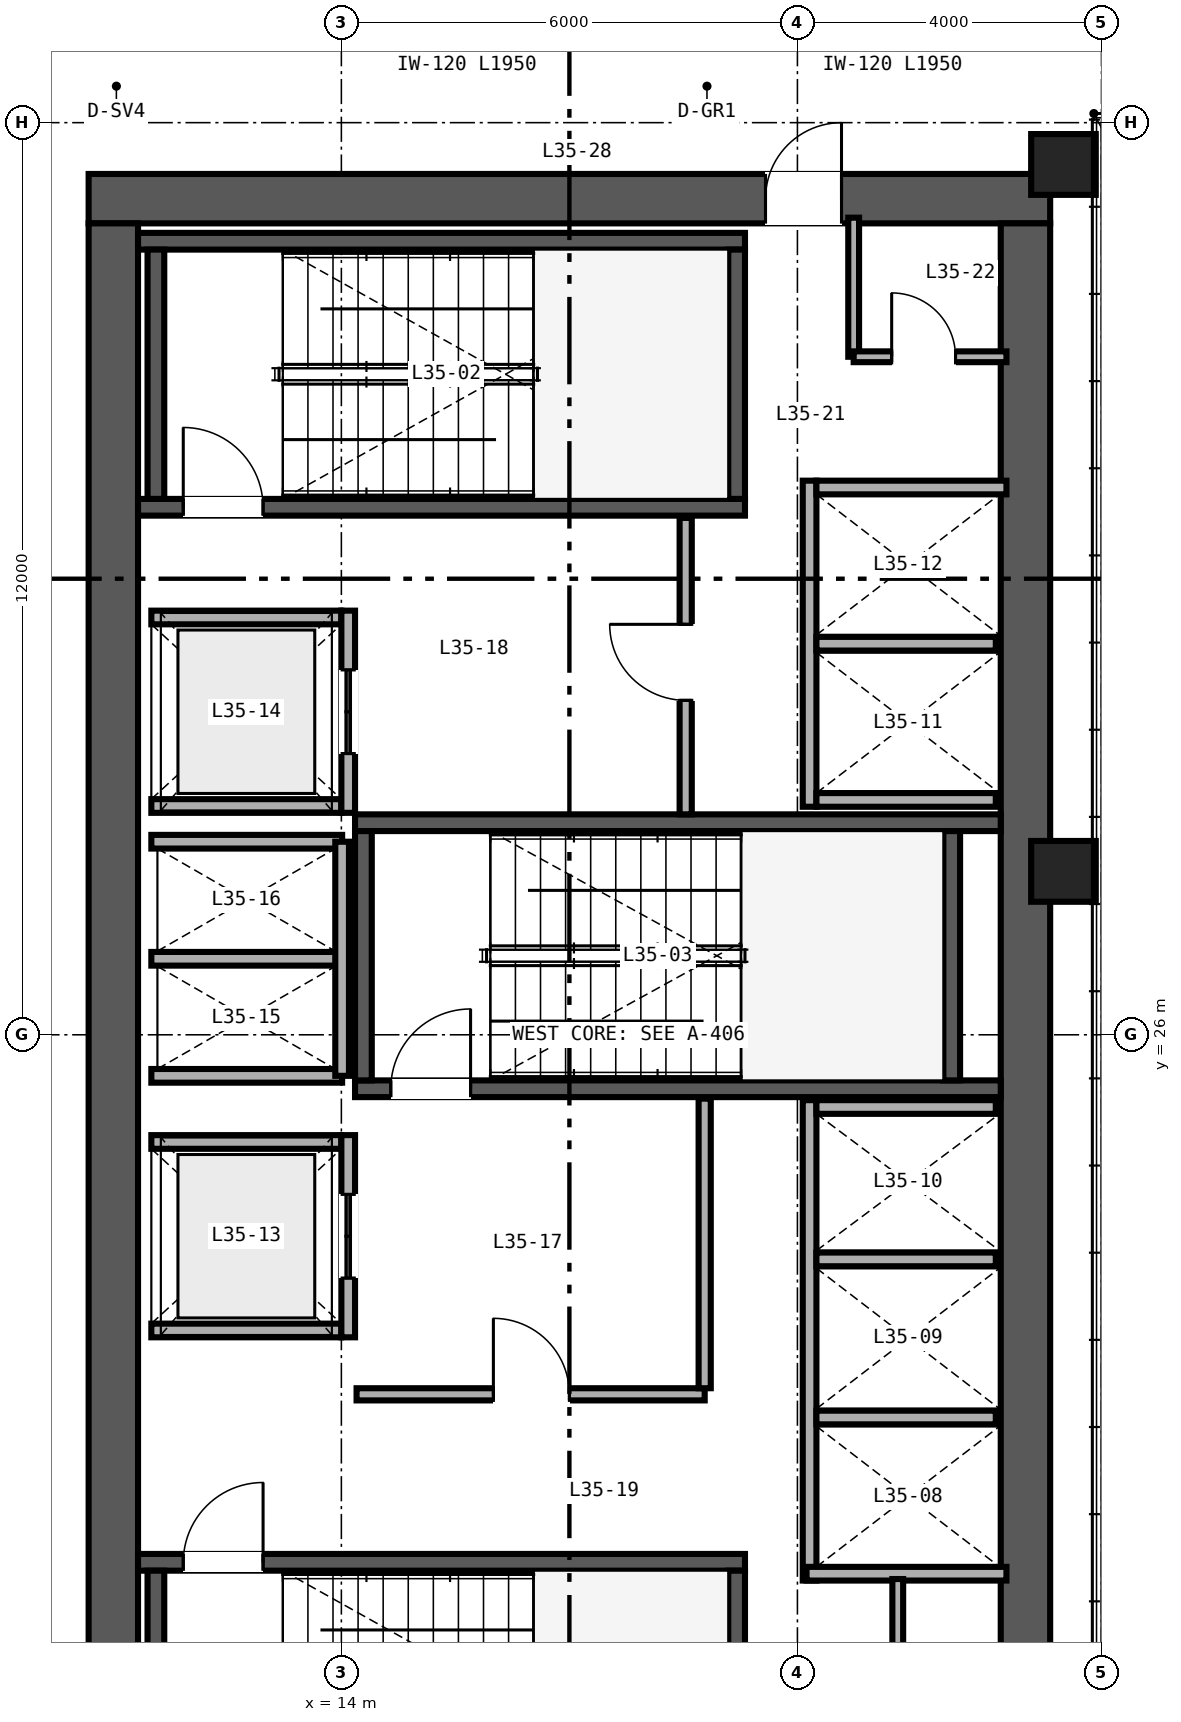
"""IFC4 building model, lengths in metres.
Left out: names, types, materials, properties, quantities, classifications, styles, units other than length and angle.
Written with IfcOpenShell. Run it as: python <this file> out.ifc"""

import sys

from ifc_helpers import new_model, si_unit, direction, frame, frame_2d, origin, origin_2d, place, context, subcontext, project, spatial, rectangle, hollow_rectangle, extrude, source, transform, mapped, element, fill, save


model = new_model("IFC4")
c1 = context("Model", 3, precision=1e-05, world=origin(), true_north=direction((0.0, 1.0)))
c2 = subcontext(c1, "Body", "Model", "MODEL_VIEW")
j1 = project(units=[si_unit("LENGTHUNIT", "METRE"), si_unit("PLANEANGLEUNIT", "RADIAN")], contexts=[c1])
p1 = place(None, origin())
s1 = spatial("IfcSite", under=j1, at=p1, CompositionType="ELEMENT")
p2 = place(p1, origin())
s2 = spatial("IfcBuilding", under=s1, at=p2, CompositionType="ELEMENT")
p3 = place(p2, frame((0.0, 0.0, 140.4)))
s3 = spatial("IfcBuildingStorey", under=s2, at=p3, CompositionType="ELEMENT", Elevation=140.4)
p4 = place(p3, frame((10.675, 37.0, 0.0), z_axis=(0.0, 0.0, 1.0), x_axis=(1.0, 0.0, 0.0)))
e1 = element("IfcWall", 1, at=p4, inside=s3, PredefinedType="SHEAR", context=c2, shape_type="SweptSolid", body=[
    extrude(rectangle(XDim=12.65, YDim=0.65, at=frame_2d((6.325, 0.0))), origin(), (0.0, 0.0, 1.0), 3.36),
])
p5 = place(p4, frame((8.905, 0.0, 0.0)))
e2 = element("IfcOpeningElement", 2, at=p5, cuts=e1, PredefinedType="OPENING", context=c2, shape_type="SweptSolid", body=[
    extrude(rectangle(XDim=1.0, YDim=2.15, at=frame_2d((0.5, 1.075))), frame((0.0, 0.335, 0.0), z_axis=(0.0, -1.0, 0.0), x_axis=(1.0, 0.0, 0.0)), (0.0, 0.0, 1.0), 0.67),
])
for number, where, z_axis, x_axis in (
    (3, (11.0, 15.325, 0.0), (0.0, 0.0, 1.0), (0.0, 1.0, 0.0)),
    (4, (23.0, 15.325, 0.0), (0.0, 0.0, 1.0), (0.0, 1.0, 0.0)),
):
    element("IfcWall", number, at=place(p3, frame(where, z_axis=z_axis, x_axis=x_axis)), inside=s3, PredefinedType="SHEAR", context=c2, shape_type="SweptSolid", body=[
        extrude(rectangle(XDim=21.35, YDim=0.65, at=frame_2d((10.675, 0.0))), origin(), (0.0, 0.0, 1.0), 3.36),
    ])
p6 = place(p3, frame((11.325, 19.06, 0.0), z_axis=(0.0, 0.0, 1.0), x_axis=(1.0, 0.0, 0.0)))
e5 = element("IfcWall", 5, at=p6, inside=s3, PredefinedType="SHEAR", context=c2, shape_type="SweptSolid", body=[
    extrude(rectangle(XDim=7.985, YDim=0.22, at=frame_2d((3.993, 0.0))), origin(), (0.0, 0.0, 1.0), 3.4),
])
p7 = place(p6, frame((0.595, 0.0, 0.0)))
e6 = element("IfcOpeningElement", 6, at=p7, cuts=e5, PredefinedType="OPENING", context=c2, shape_type="SweptSolid", body=[
    extrude(rectangle(XDim=1.05, YDim=2.15, at=frame_2d((0.525, 1.075))), frame((0.0, 0.12, 0.0), z_axis=(0.0, -1.0, 0.0), x_axis=(1.0, 0.0, 0.0)), (0.0, 0.0, 1.0), 0.24),
])
for number, where, z_axis, x_axis in (
    (7, (11.56, 15.67, 0.0), (0.0, 0.0, 1.0), (0.0, 1.0, 0.0)),
    (8, (19.2, 15.67, 0.0), (0.0, 0.0, 1.0), (0.0, 1.0, 0.0)),
):
    element("IfcWall", number, at=place(p3, frame(where, z_axis=z_axis, x_axis=x_axis)), inside=s3, PredefinedType="SHEAR", context=c2, shape_type="SweptSolid", body=[
        extrude(rectangle(XDim=3.28, YDim=0.22, at=frame_2d((1.64, 0.0))), origin(), (0.0, 0.0, 1.0), 3.4),
    ])
p8 = place(p3, frame((11.325, 32.94, 0.0), z_axis=(0.0, 0.0, 1.0), x_axis=(1.0, 0.0, 0.0)))
e9 = element("IfcWall", 9, at=p8, inside=s3, PredefinedType="SHEAR", context=c2, shape_type="SweptSolid", body=[
    extrude(rectangle(XDim=7.985, YDim=0.22, at=frame_2d((3.993, 0.0))), origin(), (0.0, 0.0, 1.0), 3.4),
])
p9 = place(p8, frame((0.595, 0.0, 0.0)))
e10 = element("IfcOpeningElement", 10, at=p9, cuts=e9, PredefinedType="OPENING", context=c2, shape_type="SweptSolid", body=[
    extrude(rectangle(XDim=1.05, YDim=2.15, at=frame_2d((0.525, 1.075))), frame((0.0, 0.12, 0.0), z_axis=(0.0, -1.0, 0.0), x_axis=(1.0, 0.0, 0.0)), (0.0, 0.0, 1.0), 0.24),
])
p10 = place(p3, frame((11.325, 36.44, 0.0), z_axis=(0.0, 0.0, 1.0), x_axis=(1.0, 0.0, 0.0)))
e11 = element("IfcWall", 11, at=p10, inside=s3, PredefinedType="SHEAR", context=c2, shape_type="SweptSolid", body=[
    extrude(rectangle(XDim=7.985, YDim=0.22, at=frame_2d((3.993, 0.0))), origin(), (0.0, 0.0, 1.0), 3.4),
])
for number, where, z_axis, x_axis in (
    (12, (11.56, 33.05, 0.0), (0.0, 0.0, 1.0), (0.0, 1.0, 0.0)),
    (13, (19.2, 33.05, 0.0), (0.0, 0.0, 1.0), (0.0, 1.0, 0.0)),
):
    element("IfcWall", number, at=place(p3, frame(where, z_axis=z_axis, x_axis=x_axis)), inside=s3, PredefinedType="SHEAR", context=c2, shape_type="SweptSolid", body=[
        extrude(rectangle(XDim=3.28, YDim=0.22, at=frame_2d((1.64, 0.0))), origin(), (0.0, 0.0, 1.0), 3.4),
    ])
p11 = place(p3, frame((14.18, 25.29, 0.0), z_axis=(0.0, 0.0, 1.0), x_axis=(1.0, 0.0, 0.0)))
e14 = element("IfcWall", 14, at=p11, inside=s3, PredefinedType="SHEAR", context=c2, shape_type="SweptSolid", body=[
    extrude(rectangle(XDim=8.495, YDim=0.22, at=frame_2d((4.248, 0.0))), origin(), (0.0, 0.0, 1.0), 3.4),
])
p12 = place(p11, frame((0.47, 0.0, 0.0)))
e15 = element("IfcOpeningElement", 15, at=p12, cuts=e14, PredefinedType="OPENING", context=c2, shape_type="SweptSolid", body=[
    extrude(rectangle(XDim=1.05, YDim=2.15, at=frame_2d((0.525, 1.075))), frame((0.0, 0.12, 0.0), z_axis=(0.0, -1.0, 0.0), x_axis=(1.0, 0.0, 0.0)), (0.0, 0.0, 1.0), 0.24),
])
p13 = place(p3, frame((14.18, 28.79, 0.0), z_axis=(0.0, 0.0, 1.0), x_axis=(1.0, 0.0, 0.0)))
e16 = element("IfcWall", 16, at=p13, inside=s3, PredefinedType="SHEAR", context=c2, shape_type="SweptSolid", body=[
    extrude(rectangle(XDim=8.495, YDim=0.22, at=frame_2d((4.248, 0.0))), origin(), (0.0, 0.0, 1.0), 3.4),
])
for number, where, z_axis, x_axis in (
    (17, (14.29, 25.4, 0.0), (0.0, 0.0, 1.0), (0.0, 1.0, 0.0)),
    (18, (22.03, 25.4, 0.0), (0.0, 0.0, 1.0), (0.0, 1.0, 0.0)),
):
    element("IfcWall", number, at=place(p3, frame(where, z_axis=z_axis, x_axis=x_axis)), inside=s3, PredefinedType="SHEAR", context=c2, shape_type="SweptSolid", body=[
        extrude(rectangle(XDim=3.28, YDim=0.22, at=frame_2d((1.64, 0.0))), origin(), (0.0, 0.0, 1.0), 3.4),
    ])
m1 = source(origin(), c2, "Body", "SweptSolid", [
    extrude(hollow_rectangle(XDim=0.85, YDim=0.8, WallThickness=0.032, at=origin_2d()), origin(), (0.0, 0.0, 1.0), 3.36),
])
for number, where, z_axis, x_axis in (
    (19, (23.5, 28.15, 0.0), (0.0, 0.0, 1.0), (1.0, 0.0, 0.0)),
    (20, (23.5, 37.45, 0.0), (0.0, 0.0, 1.0), (1.0, 0.0, 0.0)),
):
    element("IfcColumn", number, at=place(p3, frame(where, z_axis=z_axis, x_axis=x_axis)), inside=s3, PredefinedType="COLUMN", context=c2, shape_type="MappedRepresentation", body=[
        mapped(m1, transform((0.0, 0.0, 0.0), scale=1.0)),
    ])
p14 = place(p3, frame((20.16, 18.82, 0.0), z_axis=(0.0, 0.0, 1.0), x_axis=(0.0, 1.0, 0.0)))
e21 = element("IfcWall", 21, at=p14, inside=s3, PredefinedType="SOLIDWALL", context=c2, shape_type="SweptSolid", body=[
    extrude(rectangle(XDim=6.32, YDim=0.18, at=frame_2d((3.16, 0.0))), origin(), (0.0, 0.0, 1.0), 2.36),
])
p15 = place(p3, frame((20.12, 18.91, 0.0), z_axis=(0.0, 0.0, 1.0), x_axis=(1.0, 0.0, 0.0)))
e22 = element("IfcWall", 22, at=p15, inside=s3, PredefinedType="SOLIDWALL", context=c2, shape_type="SweptSolid", body=[
    extrude(rectangle(XDim=2.63, YDim=0.18, at=frame_2d((1.315, 0.0))), origin(), (0.0, 0.0, 1.0), 3.36),
])
p16 = place(p3, frame((20.25, 25.05, 0.0), z_axis=(0.0, 0.0, 1.0), x_axis=(1.0, 0.0, 0.0)))
e23 = element("IfcWall", 23, at=p16, inside=s3, PredefinedType="SOLIDWALL", context=c2, shape_type="SweptSolid", body=[
    extrude(rectangle(XDim=2.36, YDim=0.18, at=frame_2d((1.18, 0.0))), origin(), (0.0, 0.0, 1.0), 3.36),
])
p17 = place(p3, frame((20.25, 20.965, 0.0), z_axis=(0.0, 0.0, 1.0), x_axis=(1.0, 0.0, 0.0)))
e24 = element("IfcWall", 24, at=p17, inside=s3, PredefinedType="SOLIDWALL", context=c2, shape_type="SweptSolid", body=[
    extrude(rectangle(XDim=2.36, YDim=0.18, at=frame_2d((1.18, 0.0))), origin(), (0.0, 0.0, 1.0), 2.36),
])
p18 = place(p3, frame((20.25, 23.045, 0.0), z_axis=(0.0, 0.0, 1.0), x_axis=(1.0, 0.0, 0.0)))
e25 = element("IfcWall", 25, at=p18, inside=s3, PredefinedType="SOLIDWALL", context=c2, shape_type="SweptSolid", body=[
    extrude(rectangle(XDim=2.36, YDim=0.18, at=frame_2d((1.18, 0.0))), origin(), (0.0, 0.0, 1.0), 3.36),
])
p19 = place(p3, frame((20.16, 29.0, 0.0), z_axis=(0.0, 0.0, 1.0), x_axis=(0.0, 1.0, 0.0)))
e26 = element("IfcWall", 26, at=p19, inside=s3, PredefinedType="SOLIDWALL", context=c2, shape_type="SweptSolid", body=[
    extrude(rectangle(XDim=4.29, YDim=0.18, at=frame_2d((2.145, 0.0))), origin(), (0.0, 0.0, 1.0), 3.36),
])
p20 = place(p3, frame((20.25, 29.09, 0.0), z_axis=(0.0, 0.0, 1.0), x_axis=(1.0, 0.0, 0.0)))
e27 = element("IfcWall", 27, at=p20, inside=s3, PredefinedType="SOLIDWALL", context=c2, shape_type="SweptSolid", body=[
    extrude(rectangle(XDim=2.36, YDim=0.18, at=frame_2d((1.18, 0.0))), origin(), (0.0, 0.0, 1.0), 3.36),
])
p21 = place(p3, frame((20.25, 33.2, 0.0), z_axis=(0.0, 0.0, 1.0), x_axis=(1.0, 0.0, 0.0)))
e28 = element("IfcWall", 28, at=p21, inside=s3, PredefinedType="SOLIDWALL", context=c2, shape_type="SweptSolid", body=[
    extrude(rectangle(XDim=2.5, YDim=0.18, at=frame_2d((1.25, 0.0))), origin(), (0.0, 0.0, 1.0), 3.36),
])
p22 = place(p3, frame((20.25, 31.145, 0.0), z_axis=(0.0, 0.0, 1.0), x_axis=(1.0, 0.0, 0.0)))
e29 = element("IfcWall", 29, at=p22, inside=s3, PredefinedType="SOLIDWALL", context=c2, shape_type="SweptSolid", body=[
    extrude(rectangle(XDim=2.36, YDim=0.18, at=frame_2d((1.18, 0.0))), origin(), (0.0, 0.0, 1.0), 3.36),
])
for number, where, z_axis, x_axis in (
    (30, (11.5, 22.11, 0.0), (0.0, 0.0, 1.0), (1.0, 0.0, 0.0)),
    (31, (11.5, 24.59, 0.0), (0.0, 0.0, 1.0), (1.0, 0.0, 0.0)),
):
    element("IfcWall", number, at=place(p3, frame(where, z_axis=z_axis, x_axis=x_axis)), inside=s3, PredefinedType="SOLIDWALL", context=c2, shape_type="SweptSolid", body=[
        extrude(rectangle(XDim=2.5, YDim=0.18, at=frame_2d((1.25, 0.0))), origin(), (0.0, 0.0, 1.0), 3.36),
    ])
p23 = place(p3, frame((14.09, 22.02, 0.0), z_axis=(0.0, 0.0, 1.0), x_axis=(0.0, 1.0, 0.0)))
e32 = element("IfcWall", 32, at=p23, inside=s3, PredefinedType="SOLIDWALL", context=c2, shape_type="SweptSolid", body=[
    extrude(rectangle(XDim=2.66, YDim=0.18, at=frame_2d((1.33, 0.0))), origin(), (0.0, 0.0, 1.0), 3.36),
])
p24 = place(p23, frame((0.78, 0.0, 0.0)))
e33 = element("IfcOpeningElement", 33, at=p24, cuts=e32, PredefinedType="OPENING", context=c2, shape_type="SweptSolid", body=[
    extrude(rectangle(XDim=1.1, YDim=2.2, at=frame_2d((0.55, 1.1))), frame((0.0, 0.1, 0.0), z_axis=(0.0, -1.0, 0.0), x_axis=(1.0, 0.0, 0.0)), (0.0, 0.0, 1.0), 0.2),
])
for number, where, z_axis, x_axis in (
    (34, (11.5, 29.01, 0.0), (0.0, 0.0, 1.0), (1.0, 0.0, 0.0)),
    (35, (11.5, 31.49, 0.0), (0.0, 0.0, 1.0), (1.0, 0.0, 0.0)),
):
    element("IfcWall", number, at=place(p3, frame(where, z_axis=z_axis, x_axis=x_axis)), inside=s3, PredefinedType="SOLIDWALL", context=c2, shape_type="SweptSolid", body=[
        extrude(rectangle(XDim=2.5, YDim=0.18, at=frame_2d((1.25, 0.0))), origin(), (0.0, 0.0, 1.0), 3.36),
    ])
p25 = place(p3, frame((14.09, 28.92, 0.0), z_axis=(0.0, 0.0, 1.0), x_axis=(0.0, 1.0, 0.0)))
e36 = element("IfcWall", 36, at=p25, inside=s3, PredefinedType="SOLIDWALL", context=c2, shape_type="SweptSolid", body=[
    extrude(rectangle(XDim=2.66, YDim=0.18, at=frame_2d((1.33, 0.0))), origin(), (0.0, 0.0, 1.0), 3.36),
])
p26 = place(p25, frame((0.78, 0.0, 0.0)))
e37 = element("IfcOpeningElement", 37, at=p26, cuts=e36, PredefinedType="OPENING", context=c2, shape_type="SweptSolid", body=[
    extrude(rectangle(XDim=1.1, YDim=2.2, at=frame_2d((0.55, 1.1))), frame((0.0, 0.1, 0.0), z_axis=(0.0, -1.0, 0.0), x_axis=(1.0, 0.0, 0.0)), (0.0, 0.0, 1.0), 0.2),
])
for number, where, z_axis, x_axis in (
    (38, (11.5, 25.46, 0.0), (0.0, 0.0, 1.0), (1.0, 0.0, 0.0)),
    (39, (11.5, 27.0, 0.0), (0.0, 0.0, 1.0), (1.0, 0.0, 0.0)),
    (40, (11.5, 28.54, 0.0), (0.0, 0.0, 1.0), (1.0, 0.0, 0.0)),
):
    element("IfcWall", number, at=place(p3, frame(where, z_axis=z_axis, x_axis=x_axis)), inside=s3, PredefinedType="SOLIDWALL", context=c2, shape_type="SweptSolid", body=[
        extrude(rectangle(XDim=2.51, YDim=0.18, at=frame_2d((1.255, 0.0))), origin(), (0.0, 0.0, 1.0), 3.36),
    ])
p27 = place(p3, frame((14.01, 25.46, 0.0), z_axis=(0.0, 0.0, 1.0), x_axis=(0.0, 1.0, 0.0)))
e41 = element("IfcWall", 41, at=p27, inside=s3, PredefinedType="SOLIDWALL", context=c2, shape_type="SweptSolid", body=[
    extrude(rectangle(XDim=3.08, YDim=0.18, at=frame_2d((1.54, 0.0))), origin(), (0.0, 0.0, 1.0), 3.36),
])
p28 = place(p3, frame((14.2, 21.27, 0.0), z_axis=(0.0, 0.0, 1.0), x_axis=(1.0, 0.0, 0.0)))
e42 = element("IfcWall", 42, at=p28, inside=s3, PredefinedType="PARTITIONING", context=c2, shape_type="SweptSolid", body=[
    extrude(rectangle(XDim=4.58, YDim=0.16, at=frame_2d((2.29, 0.0))), origin(), (0.0, 0.0, 1.0), 3.36),
])
p29 = place(p28, frame((1.8, 0.0, 0.0)))
e43 = element("IfcOpeningElement", 43, at=p29, cuts=e42, PredefinedType="OPENING", context=c2, shape_type="SweptSolid", body=[
    extrude(rectangle(XDim=1.0, YDim=2.15, at=frame_2d((0.5, 1.075))), frame((0.0, 0.09, 0.0), z_axis=(0.0, -1.0, 0.0), x_axis=(1.0, 0.0, 0.0)), (0.0, 0.0, 1.0), 0.18),
])
p30 = place(p3, frame((18.78, 21.35, 0.0), z_axis=(0.0, 0.0, 1.0), x_axis=(0.0, 1.0, 0.0)))
e44 = element("IfcWall", 44, at=p30, inside=s3, PredefinedType="PARTITIONING", context=c2, shape_type="SweptSolid", body=[
    extrude(rectangle(XDim=3.81, YDim=0.16, at=frame_2d((1.905, 0.0))), origin(), (0.0, 0.0, 1.0), 3.36),
])
p31 = place(p3, frame((18.53, 28.9, 0.0), z_axis=(0.0, 0.0, 1.0), x_axis=(0.0, 1.0, 0.0)))
e45 = element("IfcWall", 45, at=p31, inside=s3, PredefinedType="PARTITIONING", context=c2, shape_type="SweptSolid", body=[
    extrude(rectangle(XDim=3.9, YDim=0.16, at=frame_2d((1.95, 0.0))), origin(), (0.0, 0.0, 1.0), 3.36),
])
p32 = place(p31, frame((1.5, 0.0, 0.0)))
e46 = element("IfcOpeningElement", 46, at=p32, cuts=e45, PredefinedType="OPENING", context=c2, shape_type="SweptSolid", body=[
    extrude(rectangle(XDim=1.0, YDim=2.15, at=frame_2d((0.5, 1.075))), frame((0.0, 0.09, 0.0), z_axis=(0.0, -1.0, 0.0), x_axis=(1.0, 0.0, 0.0)), (0.0, 0.0, 1.0), 0.18),
])
p33 = place(p3, frame((21.32, 15.25, 0.0), z_axis=(0.0, 0.0, 1.0), x_axis=(0.0, 1.0, 0.0)))
e47 = element("IfcWall", 47, at=p33, inside=s3, PredefinedType="PARTITIONING", context=c2, shape_type="SweptSolid", body=[
    extrude(rectangle(XDim=3.59, YDim=0.142, at=frame_2d((1.795, 0.0))), origin(), (0.0, 0.0, 1.0), 3.36),
])
p34 = place(p33, frame((1.25, 0.0, 0.0)))
e48 = element("IfcOpeningElement", 48, at=p34, cuts=e47, PredefinedType="OPENING", context=c2, shape_type="SweptSolid", body=[
    extrude(rectangle(XDim=0.84, YDim=2.1, at=frame_2d((0.42, 1.05))), frame((0.0, 0.081, 0.0), z_axis=(0.0, -1.0, 0.0), x_axis=(1.0, 0.0, 0.0)), (0.0, 0.0, 1.0), 0.162),
])
p35 = place(p3, frame((20.74, 34.92, 0.0), z_axis=(0.0, 0.0, 1.0), x_axis=(0.0, 1.0, 0.0)))
e49 = element("IfcWall", 49, at=p35, inside=s3, PredefinedType="PARTITIONING", context=c2, shape_type="SweptSolid", body=[
    extrude(rectangle(XDim=1.83, YDim=0.142, at=frame_2d((0.915, 0.0))), origin(), (0.0, 0.0, 1.0), 3.36),
])
p36 = place(p3, frame((20.74, 34.92, 0.0), z_axis=(0.0, 0.0, 1.0), x_axis=(1.0, 0.0, 0.0)))
e50 = element("IfcWall", 50, at=p36, inside=s3, PredefinedType="PARTITIONING", context=c2, shape_type="SweptSolid", body=[
    extrude(rectangle(XDim=2.01, YDim=0.142, at=frame_2d((1.005, 0.0))), origin(), (0.0, 0.0, 1.0), 3.36),
])
p37 = place(p36, frame((0.5, 0.0, 0.0)))
e51 = element("IfcOpeningElement", 51, at=p37, cuts=e50, PredefinedType="OPENING", context=c2, shape_type="SweptSolid", body=[
    extrude(rectangle(XDim=0.84, YDim=2.1, at=frame_2d((0.42, 1.05))), frame((0.0, 0.081, 0.0), z_axis=(0.0, -1.0, 0.0), x_axis=(1.0, 0.0, 0.0)), (0.0, 0.0, 1.0), 0.162),
])
m2 = source(origin(), c2, "Body", "SweptSolid", [
    extrude(rectangle(XDim=1.05, YDim=2.15, at=frame_2d((0.525, 1.075))), frame((0.0, 0.025, 0.0), z_axis=(0.0, -1.0, 0.0), x_axis=(1.0, 0.0, 0.0)), (0.0, 0.0, 1.0), 0.05),
])
p38 = place(p7, origin())
e52 = element("IfcDoor", 52, at=p38, inside=s3, OperationType="SINGLE_SWING_RIGHT", PredefinedType="DOOR", context=c2, shape_type="MappedRepresentation", body=[
    mapped(m2, transform((0.0, 0.0, 0.0), scale=1.0)),
])
fill(e6, e52)
p39 = place(p9, origin())
e53 = element("IfcDoor", 53, at=p39, inside=s3, OperationType="SINGLE_SWING_LEFT", PredefinedType="DOOR", context=c2, shape_type="MappedRepresentation", body=[
    mapped(m2, transform((0.0, 0.0, 0.0), scale=1.0)),
])
fill(e10, e53)
p40 = place(p12, origin())
e54 = element("IfcDoor", 54, at=p40, inside=s3, OperationType="SINGLE_SWING_RIGHT", PredefinedType="DOOR", context=c2, shape_type="MappedRepresentation", body=[
    mapped(m2, transform((0.0, 0.0, 0.0), scale=1.0)),
])
fill(e15, e54)
m3 = source(origin(), c2, "Body", "SweptSolid", [
    extrude(rectangle(XDim=1.1, YDim=2.2, at=frame_2d((0.55, 1.1))), frame((0.0, 0.025, 0.0), z_axis=(0.0, -1.0, 0.0), x_axis=(1.0, 0.0, 0.0)), (0.0, 0.0, 1.0), 0.05),
])
p41 = place(p24, origin())
e55 = element("IfcDoor", 55, at=p41, inside=s3, OperationType="DOUBLE_DOOR_SLIDING", PredefinedType="DOOR", context=c2, shape_type="MappedRepresentation", body=[
    mapped(m3, transform((0.0, 0.0, 0.0), scale=1.0)),
])
fill(e33, e55)
p42 = place(p26, origin())
e56 = element("IfcDoor", 56, at=p42, inside=s3, OperationType="DOUBLE_DOOR_SLIDING", PredefinedType="DOOR", context=c2, shape_type="MappedRepresentation", body=[
    mapped(m3, transform((0.0, 0.0, 0.0), scale=1.0)),
])
fill(e37, e56)
m4 = source(origin(), c2, "Body", "SweptSolid", [
    extrude(rectangle(XDim=1.0, YDim=2.15, at=frame_2d((0.5, 1.075))), frame((0.0, 0.025, 0.0), z_axis=(0.0, -1.0, 0.0), x_axis=(1.0, 0.0, 0.0)), (0.0, 0.0, 1.0), 0.05),
])
p43 = place(p29, origin())
e57 = element("IfcDoor", 57, at=p43, inside=s3, OperationType="SINGLE_SWING_LEFT", PredefinedType="DOOR", context=c2, shape_type="MappedRepresentation", body=[
    mapped(m4, transform((0.0, 0.0, 0.0), scale=1.0)),
])
fill(e43, e57)
p44 = place(p32, origin())
e58 = element("IfcDoor", 58, at=p44, inside=s3, OperationType="SINGLE_SWING_RIGHT", PredefinedType="DOOR", context=c2, shape_type="MappedRepresentation", body=[
    mapped(m4, transform((0.0, 0.0, 0.0), scale=1.0)),
])
fill(e46, e58)
m5 = source(origin(), c2, "Body", "SweptSolid", [
    extrude(rectangle(XDim=0.84, YDim=2.1, at=frame_2d((0.42, 1.05))), frame((0.0, 0.025, 0.0), z_axis=(0.0, -1.0, 0.0), x_axis=(1.0, 0.0, 0.0)), (0.0, 0.0, 1.0), 0.05),
])
p45 = place(p37, origin())
e59 = element("IfcDoor", 59, at=p45, inside=s3, OperationType="SINGLE_SWING_LEFT", PredefinedType="DOOR", context=c2, shape_type="MappedRepresentation", body=[
    mapped(m5, transform((0.0, 0.0, 0.0), scale=1.0)),
])
fill(e51, e59)
p46 = place(p5, origin())
e60 = element("IfcDoor", 60, at=p46, inside=s3, OperationType="SINGLE_SWING_RIGHT", PredefinedType="DOOR", context=c2, shape_type="MappedRepresentation", body=[
    mapped(m4, transform((0.0, 0.0, 0.0), scale=1.0)),
])
fill(e2, e60)
save(model, sys.argv[1])
